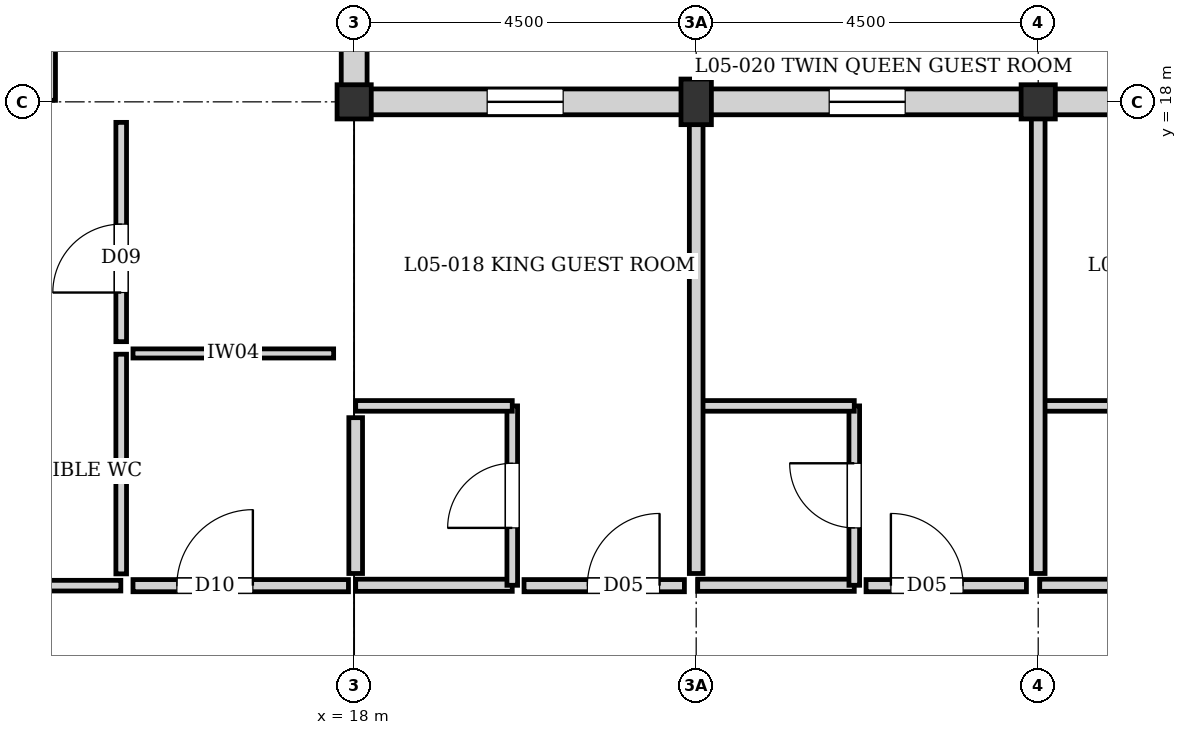
"""IFC4 building model, lengths in metres.
Left out: names, types, materials, properties, quantities, classifications, styles, units other than length and angle.
Written with IfcOpenShell. Run it as: python <this file> out.ifc"""

import sys

from ifc_helpers import new_model, si_unit, direction, frame, frame_2d, origin, origin_2d, place, context, subcontext, project, spatial, rectangle, extrude, element, fill, save


model = new_model("IFC4")
c1 = context("Model", 3, precision=1e-05, world=origin(), true_north=direction((0.0, 1.0)))
c2 = subcontext(c1, "Body", "Model", "MODEL_VIEW")
j1 = project(units=[si_unit("LENGTHUNIT", "METRE"), si_unit("PLANEANGLEUNIT", "RADIAN")], contexts=[c1])
p1 = place(None, origin())
s1 = spatial("IfcSite", under=j1, at=p1, CompositionType="ELEMENT")
p2 = place(p1, origin())
s2 = spatial("IfcBuilding", under=s1, at=p2, CompositionType="ELEMENT")
p3 = place(p2, frame((0.0, 0.0, 17.6)))
s3 = spatial("IfcBuildingStorey", under=s2, at=p3, CompositionType="ELEMENT", Elevation=17.6)
for number, where, z_axis, x_axis in (
    (1, (18.0, 18.0, 0.0), (0.0, 0.0, 1.0), (1.0, 0.0, 0.0)),
    (2, (27.0, 18.0, 0.0), (0.0, 0.0, 1.0), (1.0, 0.0, 0.0)),
):
    element("IfcColumn", number, at=place(p3, frame(where, z_axis=z_axis, x_axis=x_axis)), inside=s3, PredefinedType="COLUMN", context=c2, shape_type="SweptSolid", body=[
        extrude(rectangle(XDim=0.45, YDim=0.45, at=origin_2d()), origin(), (0.0, 0.0, 1.0), 3.04),
    ])
p4 = place(p3, frame((22.5, 18.0, 0.0), z_axis=(0.0, 0.0, 1.0), x_axis=(1.0, 0.0, 0.0)))
e3 = element("IfcColumn", 3, at=p4, inside=s3, PredefinedType="PILASTER", context=c2, shape_type="SweptSolid", body=[
    extrude(rectangle(XDim=0.4, YDim=0.6, at=origin_2d()), origin(), (0.0, 0.0, 1.0), 3.04),
])
p5 = place(p3, frame((18.0, 27.0, 0.0), z_axis=(0.0, 0.0, 1.0), x_axis=(0.0, -1.0, 0.0)))
e4 = element("IfcWall", 4, at=p5, inside=s3, PredefinedType="SOLIDWALL", context=c2, shape_type="SweptSolid", body=[
    extrude(rectangle(XDim=8.845, YDim=0.34, at=frame_2d((4.422, 0.0))), origin(), (0.0, 0.0, 1.0), 2.42),
])
p6 = place(p5, frame((1.75, 0.0, 0.35)))
e5 = element("IfcOpeningElement", 5, at=p6, cuts=e4, PredefinedType="OPENING", context=c2, shape_type="SweptSolid", body=[
    extrude(rectangle(XDim=1.0, YDim=1.6, at=frame_2d((0.5, 0.8))), frame((0.0, 0.18, 0.0), z_axis=(0.0, -1.0, 0.0), x_axis=(1.0, 0.0, 0.0)), (0.0, 0.0, 1.0), 0.36),
])
p7 = place(p5, frame((6.25, 0.0, 0.35)))
e6 = element("IfcOpeningElement", 6, at=p7, cuts=e4, PredefinedType="OPENING", context=c2, shape_type="SweptSolid", body=[
    extrude(rectangle(XDim=1.0, YDim=1.6, at=frame_2d((0.5, 0.8))), frame((0.0, 0.18, 0.0), z_axis=(0.0, -1.0, 0.0), x_axis=(1.0, 0.0, 0.0)), (0.0, 0.0, 1.0), 0.36),
])
p8 = place(p3, frame((18.0, 18.0, 0.0), z_axis=(0.0, 0.0, 1.0), x_axis=(1.0, 0.0, 0.0)))
e7 = element("IfcWall", 7, at=p8, inside=s3, PredefinedType="SOLIDWALL", context=c2, shape_type="SweptSolid", body=[
    extrude(rectangle(XDim=9.0, YDim=0.34, at=frame_2d((4.5, 0.0))), origin(), (0.0, 0.0, 1.0), 2.48),
])
p9 = place(p8, frame((1.75, 0.0, 0.35)))
e8 = element("IfcOpeningElement", 8, at=p9, cuts=e7, PredefinedType="OPENING", context=c2, shape_type="SweptSolid", body=[
    extrude(rectangle(XDim=1.0, YDim=1.6, at=frame_2d((0.5, 0.8))), frame((0.0, 0.18, 0.0), z_axis=(0.0, -1.0, 0.0), x_axis=(1.0, 0.0, 0.0)), (0.0, 0.0, 1.0), 0.36),
])
p10 = place(p8, frame((6.25, 0.0, 0.35)))
e9 = element("IfcOpeningElement", 9, at=p10, cuts=e7, PredefinedType="OPENING", context=c2, shape_type="SweptSolid", body=[
    extrude(rectangle(XDim=1.0, YDim=1.6, at=frame_2d((0.5, 0.8))), frame((0.0, 0.18, 0.0), z_axis=(0.0, -1.0, 0.0), x_axis=(1.0, 0.0, 0.0)), (0.0, 0.0, 1.0), 0.36),
])
p11 = place(p3, frame((27.0, 18.0, 0.0), z_axis=(0.0, 0.0, 1.0), x_axis=(1.0, 0.0, 0.0)))
e10 = element("IfcWall", 10, at=p11, inside=s3, PredefinedType="SOLIDWALL", context=c2, shape_type="SweptSolid", body=[
    extrude(rectangle(XDim=9.0, YDim=0.34, at=frame_2d((4.5, 0.0))), origin(), (0.0, 0.0, 1.0), 2.42),
])
p12 = place(p11, frame((1.75, 0.0, 0.35)))
e11 = element("IfcOpeningElement", 11, at=p12, cuts=e10, PredefinedType="OPENING", context=c2, shape_type="SweptSolid", body=[
    extrude(rectangle(XDim=1.0, YDim=1.6, at=frame_2d((0.5, 0.8))), frame((0.0, 0.18, 0.0), z_axis=(0.0, -1.0, 0.0), x_axis=(1.0, 0.0, 0.0)), (0.0, 0.0, 1.0), 0.36),
])
p13 = place(p11, frame((6.25, 0.0, 0.35)))
e12 = element("IfcOpeningElement", 12, at=p13, cuts=e10, PredefinedType="OPENING", context=c2, shape_type="SweptSolid", body=[
    extrude(rectangle(XDim=1.0, YDim=1.6, at=frame_2d((0.5, 0.8))), frame((0.0, 0.18, 0.0), z_axis=(0.0, -1.0, 0.0), x_axis=(1.0, 0.0, 0.0)), (0.0, 0.0, 1.0), 0.36),
])
p14 = place(p3, frame((18.02, 11.64, 0.0), z_axis=(0.0, 0.0, 1.0), x_axis=(1.0, 0.0, 0.0)))
e13 = element("IfcWall", 13, at=p14, inside=s3, PredefinedType="PARTITIONING", context=c2, shape_type="SweptSolid", body=[
    extrude(rectangle(XDim=2.06, YDim=0.16, at=frame_2d((1.03, 0.0))), origin(), (0.0, 0.0, 1.0), 2.82),
])
p15 = place(p3, frame((20.08, 11.64, 0.0), z_axis=(0.0, 0.0, 1.0), x_axis=(0.0, 1.0, 0.0)))
e14 = element("IfcWall", 14, at=p15, inside=s3, PredefinedType="PLUMBINGWALL", context=c2, shape_type="SweptSolid", body=[
    extrude(rectangle(XDim=2.36, YDim=0.14, at=frame_2d((1.18, 0.0))), origin(), (0.0, 0.0, 1.0), 2.82),
])
p16 = place(p15, frame((0.755, 0.0, 0.0)))
e15 = element("IfcOpeningElement", 15, at=p16, cuts=e14, PredefinedType="OPENING", context=c2, shape_type="SweptSolid", body=[
    extrude(rectangle(XDim=0.85, YDim=2.04, at=frame_2d((0.425, 1.02))), frame((0.0, 0.08, 0.0), z_axis=(0.0, -1.0, 0.0), x_axis=(1.0, 0.0, 0.0)), (0.0, 0.0, 1.0), 0.16),
])
p17 = place(p3, frame((18.02, 14.0, 0.0), z_axis=(0.0, 0.0, 1.0), x_axis=(1.0, 0.0, 0.0)))
e16 = element("IfcWall", 16, at=p17, inside=s3, PredefinedType="PLUMBINGWALL", context=c2, shape_type="SweptSolid", body=[
    extrude(rectangle(XDim=2.06, YDim=0.14, at=frame_2d((1.03, 0.0))), origin(), (0.0, 0.0, 1.0), 2.82),
])
p18 = place(p3, frame((22.52, 11.64, 0.0), z_axis=(0.0, 0.0, 1.0), x_axis=(1.0, 0.0, 0.0)))
e17 = element("IfcWall", 17, at=p18, inside=s3, PredefinedType="PARTITIONING", context=c2, shape_type="SweptSolid", body=[
    extrude(rectangle(XDim=2.06, YDim=0.16, at=frame_2d((1.03, 0.0))), origin(), (0.0, 0.0, 1.0), 2.82),
])
p19 = place(p3, frame((24.58, 11.64, 0.0), z_axis=(0.0, 0.0, 1.0), x_axis=(0.0, 1.0, 0.0)))
e18 = element("IfcWall", 18, at=p19, inside=s3, PredefinedType="PLUMBINGWALL", context=c2, shape_type="SweptSolid", body=[
    extrude(rectangle(XDim=2.36, YDim=0.14, at=frame_2d((1.18, 0.0))), origin(), (0.0, 0.0, 1.0), 2.82),
])
p20 = place(p19, frame((0.755, 0.0, 0.0)))
e19 = element("IfcOpeningElement", 19, at=p20, cuts=e18, PredefinedType="OPENING", context=c2, shape_type="SweptSolid", body=[
    extrude(rectangle(XDim=0.85, YDim=2.04, at=frame_2d((0.425, 1.02))), frame((0.0, 0.08, 0.0), z_axis=(0.0, -1.0, 0.0), x_axis=(1.0, 0.0, 0.0)), (0.0, 0.0, 1.0), 0.16),
])
p21 = place(p3, frame((22.52, 14.0, 0.0), z_axis=(0.0, 0.0, 1.0), x_axis=(1.0, 0.0, 0.0)))
e20 = element("IfcWall", 20, at=p21, inside=s3, PredefinedType="PLUMBINGWALL", context=c2, shape_type="SweptSolid", body=[
    extrude(rectangle(XDim=2.06, YDim=0.14, at=frame_2d((1.03, 0.0))), origin(), (0.0, 0.0, 1.0), 2.82),
])
p22 = place(p3, frame((27.02, 11.64, 0.0), z_axis=(0.0, 0.0, 1.0), x_axis=(1.0, 0.0, 0.0)))
e21 = element("IfcWall", 21, at=p22, inside=s3, PredefinedType="PARTITIONING", context=c2, shape_type="SweptSolid", body=[
    extrude(rectangle(XDim=2.06, YDim=0.16, at=frame_2d((1.03, 0.0))), origin(), (0.0, 0.0, 1.0), 2.82),
])
for number, where, z_axis, x_axis in (
    (22, (27.02, 14.0, 0.0), (0.0, 0.0, 1.0), (1.0, 0.0, 0.0)),
    (23, (14.0, 18.02, 0.0), (0.0, 0.0, 1.0), (0.0, 1.0, 0.0)),
):
    element("IfcWall", number, at=place(p3, frame(where, z_axis=z_axis, x_axis=x_axis)), inside=s3, PredefinedType="PLUMBINGWALL", context=c2, shape_type="SweptSolid", body=[
        extrude(rectangle(XDim=2.06, YDim=0.14, at=frame_2d((1.03, 0.0))), origin(), (0.0, 0.0, 1.0), 2.82),
    ])
p23 = place(p3, frame((22.5, 11.795, 0.0), z_axis=(0.0, 0.0, 1.0), x_axis=(0.0, 1.0, 0.0)))
e24 = element("IfcWall", 24, at=p23, inside=s3, PredefinedType="PARTITIONING", context=c2, shape_type="SweptSolid", body=[
    extrude(rectangle(XDim=6.03, YDim=0.18, at=frame_2d((3.015, 0.0))), origin(), (0.0, 0.0, 1.0), 2.82),
])
p24 = place(p3, frame((27.0, 11.795, 0.0), z_axis=(0.0, 0.0, 1.0), x_axis=(0.0, 1.0, 0.0)))
e25 = element("IfcWall", 25, at=p24, inside=s3, PredefinedType="PARTITIONING", context=c2, shape_type="SweptSolid", body=[
    extrude(rectangle(XDim=6.03, YDim=0.18, at=frame_2d((3.015, 0.0))), origin(), (0.0, 0.0, 1.0), 2.29),
])
p25 = place(p3, frame((18.02, 11.795, 0.0), z_axis=(0.0, 0.0, 1.0), x_axis=(0.0, 1.0, 0.0)))
e26 = element("IfcWall", 26, at=p25, inside=s3, PredefinedType="PARTITIONING", context=c2, shape_type="SweptSolid", body=[
    extrude(rectangle(XDim=2.05, YDim=0.18, at=frame_2d((1.025, 0.0))), origin(), (0.0, 0.0, 1.0), 2.48),
])
p26 = place(p3, frame((11.72, 11.635, 0.0), z_axis=(0.0, 0.0, 1.0), x_axis=(1.0, 0.0, 0.0)))
e27 = element("IfcWall", 27, at=p26, inside=s3, PredefinedType="PLUMBINGWALL", context=c2, shape_type="SweptSolid", body=[
    extrude(rectangle(XDim=3.21, YDim=0.14, at=frame_2d((1.605, 0.0))), origin(), (0.0, 0.0, 1.0), 2.82),
])
p27 = place(p3, frame((14.935, 11.79, 0.0), z_axis=(0.0, 0.0, 1.0), x_axis=(0.0, 1.0, 0.0)))
e28 = element("IfcWall", 28, at=p27, inside=s3, PredefinedType="PLUMBINGWALL", context=c2, shape_type="SweptSolid", body=[
    extrude(rectangle(XDim=2.89, YDim=0.14, at=frame_2d((1.445, 0.0))), origin(), (0.0, 0.0, 1.0), 2.82),
])
p28 = place(p3, frame((15.09, 14.69, 0.0), z_axis=(0.0, 0.0, 1.0), x_axis=(1.0, 0.0, 0.0)))
e29 = element("IfcWall", 29, at=p28, inside=s3, PredefinedType="PARTITIONING", context=c2, shape_type="SweptSolid", body=[
    extrude(rectangle(XDim=2.64, YDim=0.12, at=frame_2d((1.32, 0.0))), origin(), (0.0, 0.0, 1.0), 2.82),
])
p29 = place(p3, frame((15.09, 11.635, 0.0), z_axis=(0.0, 0.0, 1.0), x_axis=(1.0, 0.0, 0.0)))
e30 = element("IfcWall", 30, at=p29, inside=s3, PredefinedType="PARTITIONING", context=c2, shape_type="SweptSolid", body=[
    extrude(rectangle(XDim=2.835, YDim=0.16, at=frame_2d((1.417, 0.0))), origin(), (0.0, 0.0, 1.0), 2.82),
])
p30 = place(p29, frame((0.577, 0.0, 0.0)))
e31 = element("IfcOpeningElement", 31, at=p30, cuts=e30, PredefinedType="OPENING", context=c2, shape_type="SweptSolid", body=[
    extrude(rectangle(XDim=1.0, YDim=2.1, at=frame_2d((0.5, 1.05))), frame((0.0, 0.09, 0.0), z_axis=(0.0, -1.0, 0.0), x_axis=(1.0, 0.0, 0.0)), (0.0, 0.0, 1.0), 0.18),
])
p31 = place(p3, frame((20.235, 11.635, 0.0), z_axis=(0.0, 0.0, 1.0), x_axis=(1.0, 0.0, 0.0)))
e32 = element("IfcWall", 32, at=p31, inside=s3, PredefinedType="PARTITIONING", context=c2, shape_type="SweptSolid", body=[
    extrude(rectangle(XDim=2.11, YDim=0.16, at=frame_2d((1.055, 0.0))), origin(), (0.0, 0.0, 1.0), 2.82),
])
p32 = place(p31, frame((0.833, 0.0, 0.0)))
e33 = element("IfcOpeningElement", 33, at=p32, cuts=e32, PredefinedType="OPENING", context=c2, shape_type="SweptSolid", body=[
    extrude(rectangle(XDim=0.95, YDim=2.15, at=frame_2d((0.475, 1.075))), frame((0.0, 0.09, 0.0), z_axis=(0.0, -1.0, 0.0), x_axis=(1.0, 0.0, 0.0)), (0.0, 0.0, 1.0), 0.18),
])
p33 = place(p3, frame((24.735, 11.635, 0.0), z_axis=(0.0, 0.0, 1.0), x_axis=(1.0, 0.0, 0.0)))
e34 = element("IfcWall", 34, at=p33, inside=s3, PredefinedType="PARTITIONING", context=c2, shape_type="SweptSolid", body=[
    extrude(rectangle(XDim=2.11, YDim=0.16, at=frame_2d((1.055, 0.0))), origin(), (0.0, 0.0, 1.0), 2.82),
])
p34 = place(p33, frame((0.327, 0.0, 0.0)))
e35 = element("IfcOpeningElement", 35, at=p34, cuts=e34, PredefinedType="OPENING", context=c2, shape_type="SweptSolid", body=[
    extrude(rectangle(XDim=0.95, YDim=2.15, at=frame_2d((0.475, 1.075))), frame((0.0, 0.09, 0.0), z_axis=(0.0, -1.0, 0.0), x_axis=(1.0, 0.0, 0.0)), (0.0, 0.0, 1.0), 0.18),
])
p35 = place(p3, frame((14.935, 14.845, 0.0), z_axis=(0.0, 0.0, 1.0), x_axis=(0.0, 1.0, 0.0)))
e36 = element("IfcWall", 36, at=p35, inside=s3, PredefinedType="PLUMBINGWALL", context=c2, shape_type="SweptSolid", body=[
    extrude(rectangle(XDim=2.885, YDim=0.14, at=frame_2d((1.442, 0.0))), origin(), (0.0, 0.0, 1.0), 2.82),
])
p36 = place(p35, frame((0.646, 0.0, 0.0)))
e37 = element("IfcOpeningElement", 37, at=p36, cuts=e36, PredefinedType="OPENING", context=c2, shape_type="SweptSolid", body=[
    extrude(rectangle(XDim=0.9, YDim=2.1, at=frame_2d((0.45, 1.05))), frame((0.0, 0.08, 0.0), z_axis=(0.0, -1.0, 0.0), x_axis=(1.0, 0.0, 0.0)), (0.0, 0.0, 1.0), 0.16),
])
p37 = place(p9, origin())
e38 = element("IfcWindow", 38, at=p37, inside=s3, PartitioningType="SINGLE_PANEL", PredefinedType="WINDOW", context=c2, shape_type="SweptSolid", body=[
    extrude(rectangle(XDim=1.0, YDim=1.6, at=frame_2d((0.5, 0.8))), frame((0.0, 0.03, 0.0), z_axis=(0.0, -1.0, 0.0), x_axis=(1.0, 0.0, 0.0)), (0.0, 0.0, 1.0), 0.06),
])
fill(e8, e38)
p38 = place(p10, origin())
e39 = element("IfcWindow", 39, at=p38, inside=s3, PartitioningType="SINGLE_PANEL", PredefinedType="WINDOW", context=c2, shape_type="SweptSolid", body=[
    extrude(rectangle(XDim=1.0, YDim=1.6, at=frame_2d((0.5, 0.8))), frame((0.0, 0.03, 0.0), z_axis=(0.0, -1.0, 0.0), x_axis=(1.0, 0.0, 0.0)), (0.0, 0.0, 1.0), 0.06),
])
fill(e9, e39)
p39 = place(p16, origin())
e40 = element("IfcDoor", 40, at=p39, inside=s3, OperationType="SINGLE_SWING_LEFT", PredefinedType="DOOR", context=c2, shape_type="SweptSolid", body=[
    extrude(rectangle(XDim=0.85, YDim=2.04, at=frame_2d((0.425, 1.02))), frame((0.0, 0.025, 0.0), z_axis=(0.0, -1.0, 0.0), x_axis=(1.0, 0.0, 0.0)), (0.0, 0.0, 1.0), 0.05),
])
fill(e15, e40)
p40 = place(p20, origin())
e41 = element("IfcDoor", 41, at=p40, inside=s3, OperationType="SINGLE_SWING_RIGHT", PredefinedType="DOOR", context=c2, shape_type="SweptSolid", body=[
    extrude(rectangle(XDim=0.85, YDim=2.04, at=frame_2d((0.425, 1.02))), frame((0.0, 0.025, 0.0), z_axis=(0.0, -1.0, 0.0), x_axis=(1.0, 0.0, 0.0)), (0.0, 0.0, 1.0), 0.05),
])
fill(e19, e41)
p41 = place(p30, origin())
e42 = element("IfcDoor", 42, at=p41, inside=s3, OperationType="SINGLE_SWING_RIGHT", PredefinedType="DOOR", context=c2, shape_type="SweptSolid", body=[
    extrude(rectangle(XDim=1.0, YDim=2.1, at=frame_2d((0.5, 1.05))), frame((0.0, 0.025, 0.0), z_axis=(0.0, -1.0, 0.0), x_axis=(1.0, 0.0, 0.0)), (0.0, 0.0, 1.0), 0.05),
])
fill(e31, e42)
p42 = place(p32, origin())
e43 = element("IfcDoor", 43, at=p42, inside=s3, OperationType="SINGLE_SWING_RIGHT", PredefinedType="DOOR", context=c2, shape_type="SweptSolid", body=[
    extrude(rectangle(XDim=0.95, YDim=2.15, at=frame_2d((0.475, 1.075))), frame((0.0, 0.025, 0.0), z_axis=(0.0, -1.0, 0.0), x_axis=(1.0, 0.0, 0.0)), (0.0, 0.0, 1.0), 0.05),
])
fill(e33, e43)
p43 = place(p34, origin())
e44 = element("IfcDoor", 44, at=p43, inside=s3, OperationType="SINGLE_SWING_LEFT", PredefinedType="DOOR", context=c2, shape_type="SweptSolid", body=[
    extrude(rectangle(XDim=0.95, YDim=2.15, at=frame_2d((0.475, 1.075))), frame((0.0, 0.025, 0.0), z_axis=(0.0, -1.0, 0.0), x_axis=(1.0, 0.0, 0.0)), (0.0, 0.0, 1.0), 0.05),
])
fill(e35, e44)
p44 = place(p36, origin())
e45 = element("IfcDoor", 45, at=p44, inside=s3, OperationType="SINGLE_SWING_LEFT", PredefinedType="DOOR", context=c2, shape_type="SweptSolid", body=[
    extrude(rectangle(XDim=0.9, YDim=2.1, at=frame_2d((0.45, 1.05))), frame((0.0, 0.025, 0.0), z_axis=(0.0, -1.0, 0.0), x_axis=(1.0, 0.0, 0.0)), (0.0, 0.0, 1.0), 0.05),
])
fill(e37, e45)
save(model, sys.argv[1])
